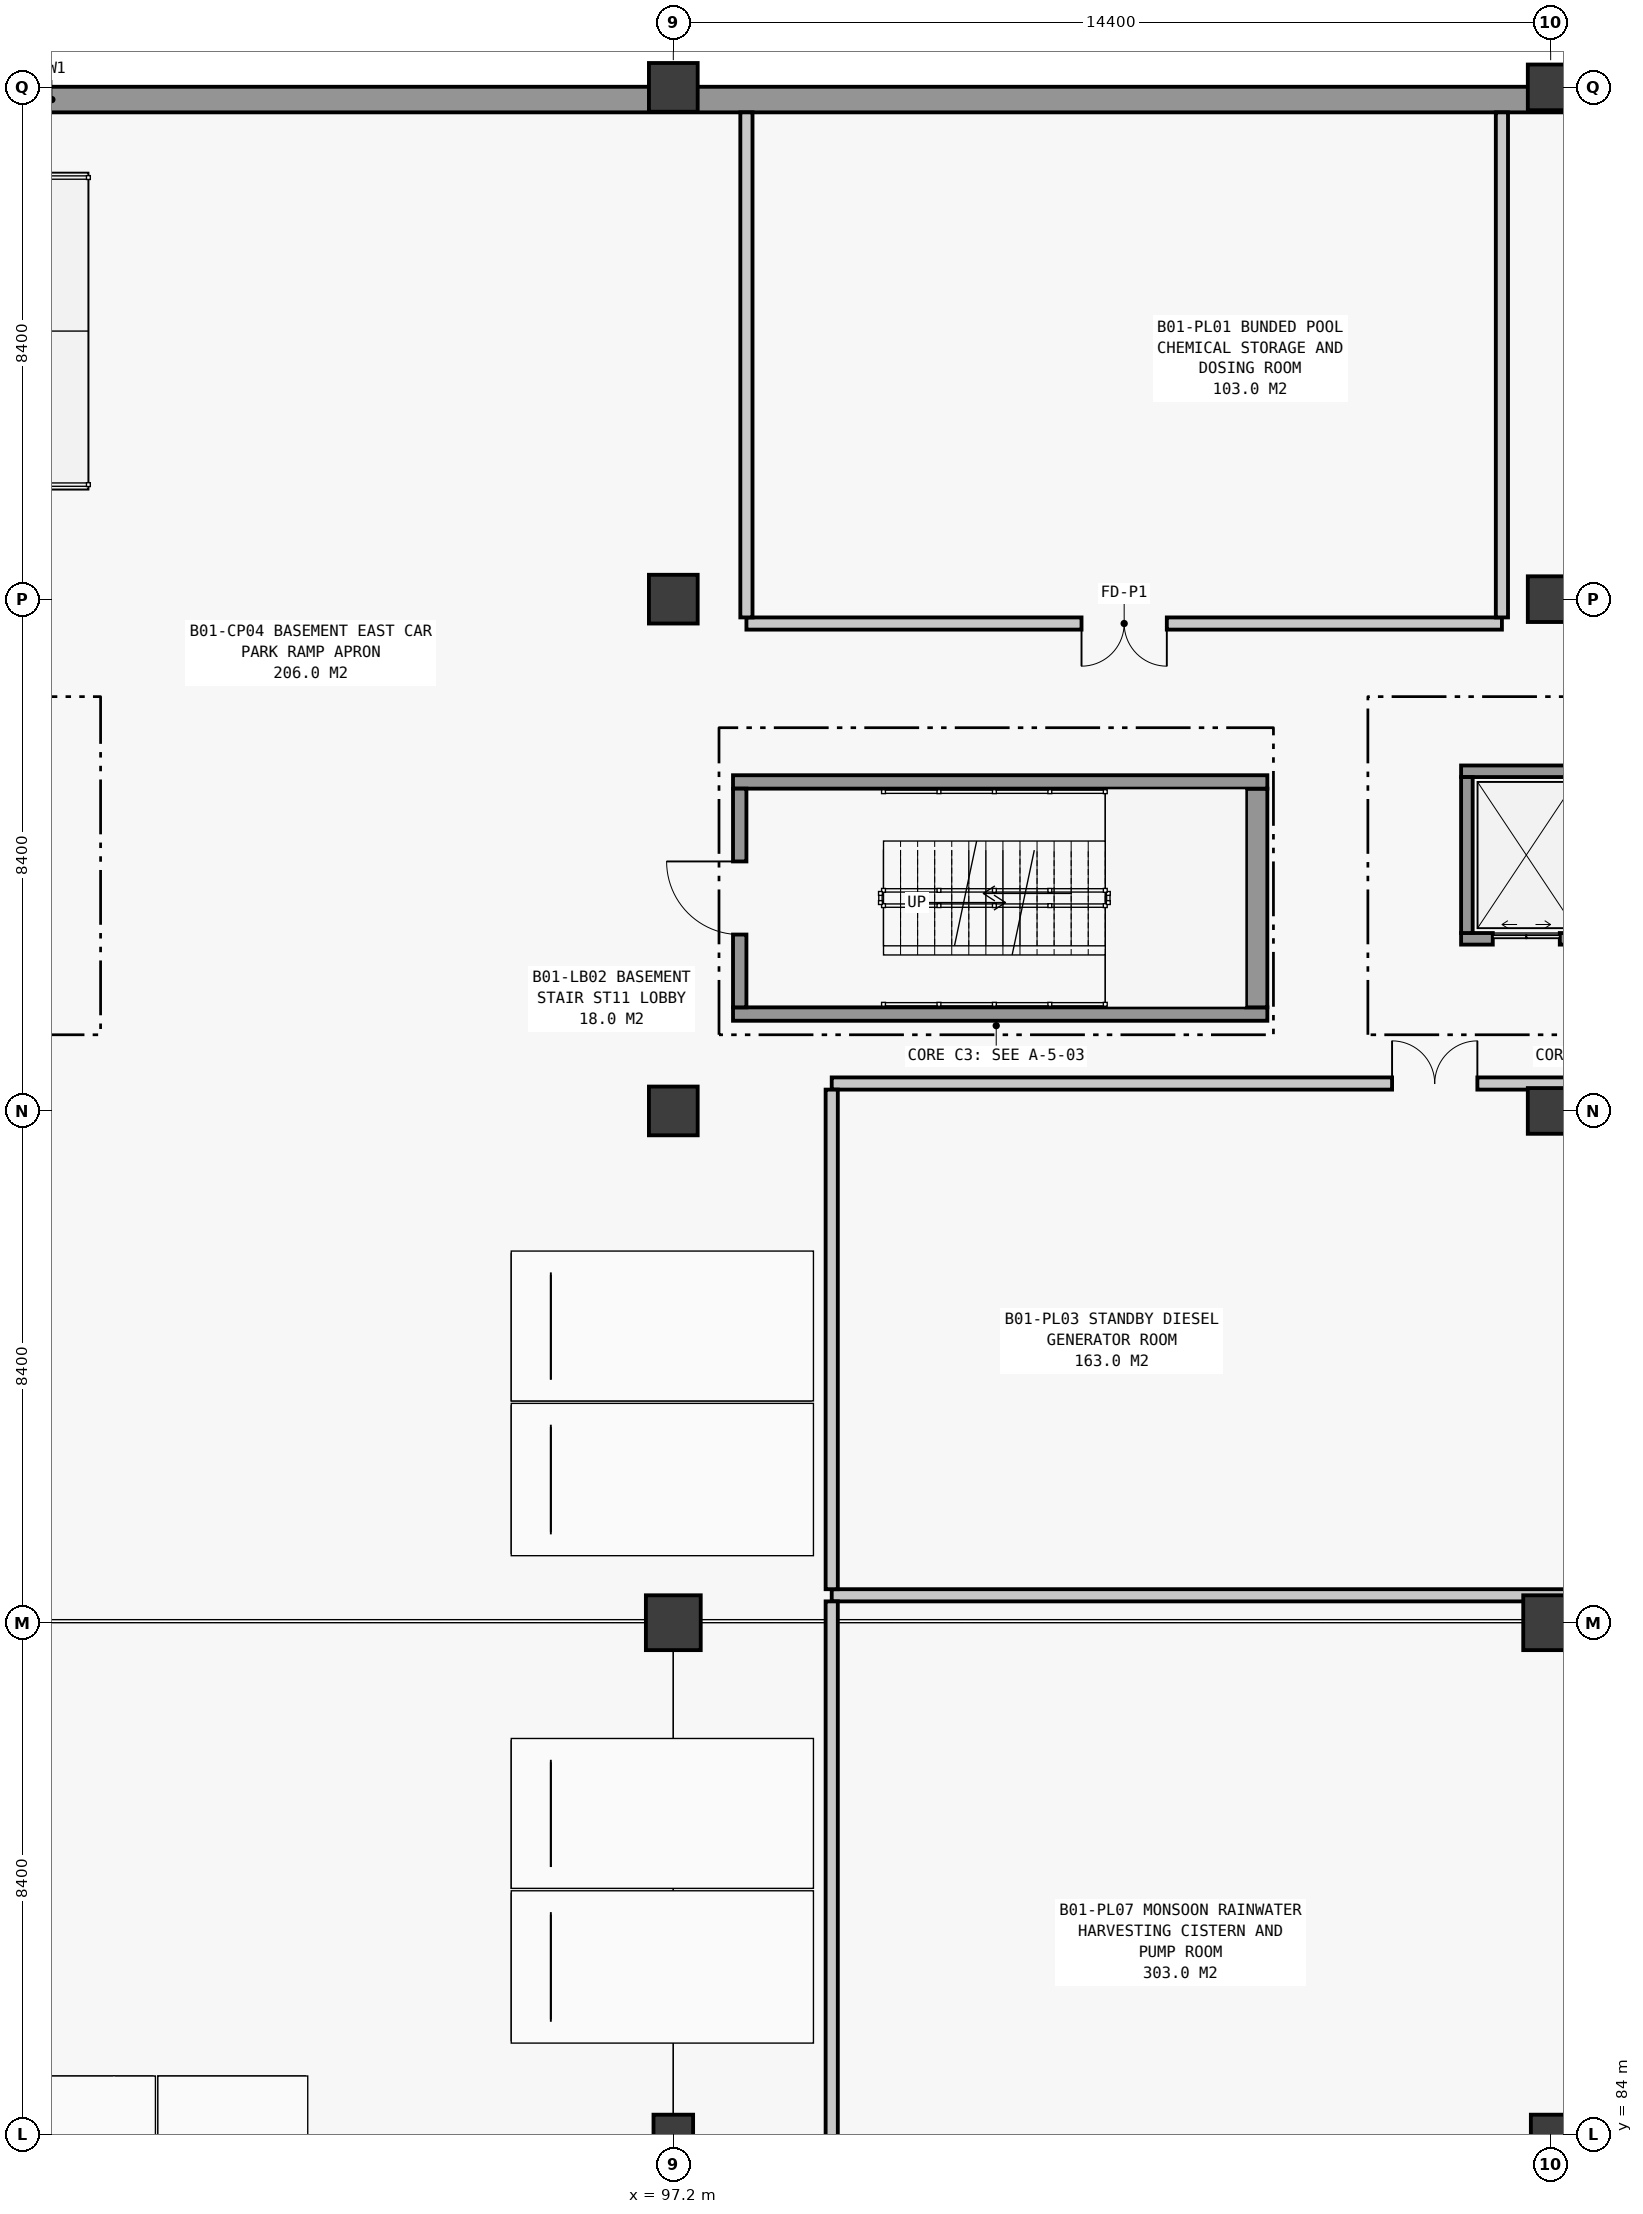
"""IFC4 building model, lengths in metres.
Left out: names, types, materials, properties, quantities, classifications, styles, units other than length and angle.
Written with IfcOpenShell. Run it as: python <this file> out.ifc"""

import sys

from ifc_helpers import new_model, si_unit, direction, frame, frame_2d, origin, origin_2d, place, context, subcontext, project, spatial, rectangle, extrude, element, fill, save


model = new_model("IFC4")
c1 = context("Model", 3, precision=1e-05, world=origin(), true_north=direction((0.0, 1.0)))
c2 = subcontext(c1, "Body", "Model", "MODEL_VIEW")
j1 = project(units=[si_unit("LENGTHUNIT", "METRE"), si_unit("PLANEANGLEUNIT", "RADIAN")], contexts=[c1])
p1 = place(None, origin())
s1 = spatial("IfcSite", under=j1, at=p1, CompositionType="ELEMENT")
p2 = place(p1, origin())
s2 = spatial("IfcBuilding", under=s1, at=p2, CompositionType="ELEMENT")
p3 = place(p2, frame((0.0, 0.0, -4.8)))
s3 = spatial("IfcBuildingStorey", under=s2, at=p3, CompositionType="ELEMENT", Elevation=-4.8)
p4 = place(p3, frame((97.2, 84.0, 0.0), z_axis=(0.0, 0.0, 1.0), x_axis=(1.0, 0.0, 0.0)))
e1 = element("IfcColumn", 1, at=p4, inside=s3, PredefinedType="COLUMN", context=c2, shape_type="SweptSolid", body=[
    extrude(rectangle(XDim=0.65, YDim=0.65, at=origin_2d()), origin(), (0.0, 0.0, 1.0), 4.8),
])
p5 = place(p3, frame((97.2, 92.4, 0.0), z_axis=(0.0, 0.0, 1.0), x_axis=(1.0, 0.0, 0.0)))
e2 = element("IfcColumn", 2, at=p5, inside=s3, PredefinedType="COLUMN", context=c2, shape_type="SweptSolid", body=[
    extrude(rectangle(XDim=0.9, YDim=0.9, at=origin_2d()), origin(), (0.0, 0.0, 1.0), 4.8),
])
for number, where, z_axis, x_axis in (
    (3, (97.2, 100.8, 0.0), (0.0, 0.0, 1.0), (1.0, 0.0, 0.0)),
    (4, (97.2, 109.2, 0.0), (0.0, 0.0, 1.0), (1.0, 0.0, 0.0)),
    (5, (97.2, 117.6, 0.0), (0.0, 0.0, 1.0), (1.0, 0.0, 0.0)),
):
    element("IfcColumn", number, at=place(p3, frame(where, z_axis=z_axis, x_axis=x_axis)), inside=s3, PredefinedType="COLUMN", context=c2, shape_type="SweptSolid", body=[
        extrude(rectangle(XDim=0.8, YDim=0.8, at=origin_2d()), origin(), (0.0, 0.0, 1.0), 4.8),
    ])
p6 = place(p3, frame((111.6, 84.0, 0.0), z_axis=(0.0, 0.0, 1.0), x_axis=(1.0, 0.0, 0.0)))
e6 = element("IfcColumn", 6, at=p6, inside=s3, PredefinedType="COLUMN", context=c2, shape_type="SweptSolid", body=[
    extrude(rectangle(XDim=0.65, YDim=0.65, at=origin_2d()), origin(), (0.0, 0.0, 1.0), 4.8),
])
p7 = place(p3, frame((111.6, 92.4, 0.0), z_axis=(0.0, 0.0, 1.0), x_axis=(1.0, 0.0, 0.0)))
e7 = element("IfcColumn", 7, at=p7, inside=s3, PredefinedType="COLUMN", context=c2, shape_type="SweptSolid", body=[
    extrude(rectangle(XDim=0.9, YDim=0.9, at=origin_2d()), origin(), (0.0, 0.0, 1.0), 4.8),
])
for number, where, z_axis, x_axis in (
    (8, (111.6, 100.8, 0.0), (0.0, 0.0, 1.0), (1.0, 0.0, 0.0)),
    (9, (111.6, 109.2, 0.0), (0.0, 0.0, 1.0), (1.0, 0.0, 0.0)),
    (10, (111.6, 117.6, 0.0), (0.0, 0.0, 1.0), (1.0, 0.0, 0.0)),
):
    element("IfcColumn", number, at=place(p3, frame(where, z_axis=z_axis, x_axis=x_axis)), inside=s3, PredefinedType="COLUMN", context=c2, shape_type="SweptSolid", body=[
        extrude(rectangle(XDim=0.75, YDim=0.75, at=origin_2d()), origin(), (0.0, 0.0, 1.0), 4.8),
    ])
p8 = place(p3, frame((125.8, 117.4, 0.0), z_axis=(0.0, 0.0, 1.0), x_axis=(-1.0, 0.0, 0.0)))
e11 = element("IfcWall", 11, at=p8, inside=s3, PredefinedType="USERDEFINED", context=c2, shape_type="SweptSolid", body=[
    extrude(rectangle(XDim=86.0, YDim=0.42, at=frame_2d((43.0, 0.0))), origin(), (0.0, 0.0, 1.0), 4.5),
])
p9 = place(p3, frame((98.18, 102.39, 0.0), z_axis=(0.0, 0.0, 1.0), x_axis=(1.0, 0.0, 0.0)))
e12 = element("IfcWall", 12, at=p9, inside=s3, PredefinedType="SOLIDWALL", context=c2, shape_type="SweptSolid", body=[
    extrude(rectangle(XDim=8.77, YDim=0.22, at=frame_2d((4.385, 0.0))), origin(), (0.0, 0.0, 1.0), 4.5),
])
p10 = place(p3, frame((106.775, 102.5, 0.0), z_axis=(0.0, 0.0, 1.0), x_axis=(0.0, 1.0, 0.0)))
e13 = element("IfcWall", 13, at=p10, inside=s3, PredefinedType="SHEAR", context=c2, shape_type="SweptSolid", body=[
    extrude(rectangle(XDim=3.59, YDim=0.35, at=frame_2d((1.795, 0.0))), origin(), (0.0, 0.0, 1.0), 4.5),
])
p11 = place(p3, frame((106.95, 106.2, 0.0), z_axis=(0.0, 0.0, 1.0), x_axis=(-1.0, 0.0, 0.0)))
e14 = element("IfcWall", 14, at=p11, inside=s3, PredefinedType="SOLIDWALL", context=c2, shape_type="SweptSolid", body=[
    extrude(rectangle(XDim=8.77, YDim=0.22, at=frame_2d((4.385, 0.0))), origin(), (0.0, 0.0, 1.0), 4.5),
])
p12 = place(p3, frame((98.29, 106.09, 0.0), z_axis=(0.0, 0.0, 1.0), x_axis=(0.0, -1.0, 0.0)))
e15 = element("IfcWall", 15, at=p12, inside=s3, PredefinedType="SOLIDWALL", context=c2, shape_type="SweptSolid", body=[
    extrude(rectangle(XDim=3.59, YDim=0.22, at=frame_2d((1.795, 0.0))), origin(), (0.0, 0.0, 1.0), 4.5),
])
p13 = place(p12, frame((1.195, 0.0, 0.0)))
e16 = element("IfcOpeningElement", 16, at=p13, cuts=e15, PredefinedType="OPENING", context=c2, shape_type="SweptSolid", body=[
    extrude(rectangle(XDim=1.2, YDim=2.2, at=frame_2d((0.6, 1.1))), frame((0.0, 0.125, 0.0), z_axis=(0.0, -1.0, 0.0), x_axis=(1.0, 0.0, 0.0)), (0.0, 0.0, 1.0), 0.25),
])
p14 = place(p3, frame((110.13, 103.625, 0.0), z_axis=(0.0, 0.0, 1.0), x_axis=(1.0, 0.0, 0.0)))
e17 = element("IfcWall", 17, at=p14, inside=s3, PredefinedType="SOLIDWALL", context=c2, shape_type="SweptSolid", body=[
    extrude(rectangle(XDim=2.14, YDim=0.19, at=frame_2d((1.07, 0.0))), origin(), (0.0, 0.0, 1.0), 4.5),
])
p15 = place(p14, frame((0.52, 0.0, 0.0)))
e18 = element("IfcOpeningElement", 18, at=p15, cuts=e17, PredefinedType="OPENING", context=c2, shape_type="SweptSolid", body=[
    extrude(rectangle(XDim=1.1, YDim=2.2, at=frame_2d((0.55, 1.1))), frame((0.0, 0.11, 0.0), z_axis=(0.0, -1.0, 0.0), x_axis=(1.0, 0.0, 0.0)), (0.0, 0.0, 1.0), 0.22),
])
p16 = place(p3, frame((112.27, 106.375, 0.0), z_axis=(0.0, 0.0, 1.0), x_axis=(-1.0, 0.0, 0.0)))
e19 = element("IfcWall", 19, at=p16, inside=s3, PredefinedType="SOLIDWALL", context=c2, shape_type="SweptSolid", body=[
    extrude(rectangle(XDim=2.14, YDim=0.19, at=frame_2d((1.07, 0.0))), origin(), (0.0, 0.0, 1.0), 4.5),
])
p17 = place(p3, frame((110.225, 106.28, 0.0), z_axis=(0.0, 0.0, 1.0), x_axis=(0.0, -1.0, 0.0)))
e20 = element("IfcWall", 20, at=p17, inside=s3, PredefinedType="SOLIDWALL", context=c2, shape_type="SweptSolid", body=[
    extrude(rectangle(XDim=2.56, YDim=0.19, at=frame_2d((1.28, 0.0))), origin(), (0.0, 0.0, 1.0), 4.5),
])
p18 = place(p3, frame((98.4, 108.8, 0.0), z_axis=(0.0, 0.0, 1.0), x_axis=(1.0, 0.0, 0.0)))
e21 = element("IfcWall", 21, at=p18, inside=s3, PredefinedType="PARTITIONING", context=c2, shape_type="SweptSolid", body=[
    extrude(rectangle(XDim=12.4, YDim=0.2, at=frame_2d((6.2, 0.0))), origin(), (0.0, 0.0, 1.0), 4.5),
])
p19 = place(p18, frame((5.5, 0.0, 0.0)))
e22 = element("IfcOpeningElement", 22, at=p19, cuts=e21, PredefinedType="OPENING", context=c2, shape_type="SweptSolid", body=[
    extrude(rectangle(XDim=1.4, YDim=2.2, at=frame_2d((0.7, 1.1))), frame((0.0, 0.115, 0.0), z_axis=(0.0, -1.0, 0.0), x_axis=(1.0, 0.0, 0.0)), (0.0, 0.0, 1.0), 0.23),
])
for number, where, z_axis, x_axis in (
    (23, (98.4, 108.9, 0.0), (0.0, 0.0, 1.0), (0.0, 1.0, 0.0)),
    (24, (110.8, 108.9, 0.0), (0.0, 0.0, 1.0), (0.0, 1.0, 0.0)),
):
    element("IfcWall", number, at=place(p3, frame(where, z_axis=z_axis, x_axis=x_axis)), inside=s3, PredefinedType="PARTITIONING", context=c2, shape_type="SweptSolid", body=[
        extrude(rectangle(XDim=8.29, YDim=0.2, at=frame_2d((4.145, 0.0))), origin(), (0.0, 0.0, 1.0), 3.55),
    ])
p20 = place(p3, frame((99.8, 101.25, 0.0), z_axis=(0.0, 0.0, 1.0), x_axis=(1.0, 0.0, 0.0)))
e25 = element("IfcWall", 25, at=p20, inside=s3, PredefinedType="PARTITIONING", context=c2, shape_type="SweptSolid", body=[
    extrude(rectangle(XDim=19.4, YDim=0.2, at=frame_2d((9.7, 0.0))), origin(), (0.0, 0.0, 1.0), 3.75),
])
p21 = place(p20, frame((9.197, 0.0, 0.0)))
e26 = element("IfcOpeningElement", 26, at=p21, cuts=e25, PredefinedType="OPENING", context=c2, shape_type="SweptSolid", body=[
    extrude(rectangle(XDim=1.4, YDim=2.2, at=frame_2d((0.7, 1.1))), frame((0.0, 0.115, 0.0), z_axis=(0.0, -1.0, 0.0), x_axis=(1.0, 0.0, 0.0)), (0.0, 0.0, 1.0), 0.23),
])
p22 = place(p3, frame((99.8, 92.85, 0.0), z_axis=(0.0, 0.0, 1.0), x_axis=(1.0, 0.0, 0.0)))
e27 = element("IfcWall", 27, at=p22, inside=s3, PredefinedType="PARTITIONING", context=c2, shape_type="SweptSolid", body=[
    extrude(rectangle(XDim=19.4, YDim=0.2, at=frame_2d((9.7, 0.0))), origin(), (0.0, 0.0, 1.0), 3.75),
])
p23 = place(p3, frame((99.8, 92.95, 0.0), z_axis=(0.0, 0.0, 1.0), x_axis=(0.0, 1.0, 0.0)))
e28 = element("IfcWall", 28, at=p23, inside=s3, PredefinedType="PARTITIONING", context=c2, shape_type="SweptSolid", body=[
    extrude(rectangle(XDim=8.2, YDim=0.2, at=frame_2d((4.1, 0.0))), origin(), (0.0, 0.0, 1.0), 3.55),
])
p24 = place(p3, frame((99.8, 80.1, 0.0), z_axis=(0.0, 0.0, 1.0), x_axis=(0.0, 1.0, 0.0)))
e29 = element("IfcWall", 29, at=p24, inside=s3, PredefinedType="PARTITIONING", context=c2, shape_type="SweptSolid", body=[
    extrude(rectangle(XDim=12.65, YDim=0.2, at=frame_2d((6.325, 0.0))), origin(), (0.0, 0.0, 1.0), 3.53),
])
p25 = place(p13, frame((1.2, 0.0, 0.0), z_axis=(0.0, 0.0, 1.0), x_axis=(-1.0, 0.0, 0.0)))
e30 = element("IfcDoor", 30, at=p25, inside=s3, OperationType="SINGLE_SWING_LEFT", PredefinedType="DOOR", context=c2, shape_type="SweptSolid", body=[
    extrude(rectangle(XDim=1.2, YDim=2.2, at=frame_2d((0.6, 1.1))), frame((0.0, 0.025, 0.0), z_axis=(0.0, -1.0, 0.0), x_axis=(1.0, 0.0, 0.0)), (0.0, 0.0, 1.0), 0.05),
])
fill(e16, e30)
p26 = place(p15, origin())
e31 = element("IfcDoor", 31, at=p26, inside=s3, OperationType="DOUBLE_DOOR_SLIDING", PredefinedType="DOOR", context=c2, shape_type="SweptSolid", body=[
    extrude(rectangle(XDim=1.1, YDim=2.2, at=frame_2d((0.55, 1.1))), frame((0.0, 0.025, 0.0), z_axis=(0.0, -1.0, 0.0), x_axis=(1.0, 0.0, 0.0)), (0.0, 0.0, 1.0), 0.05),
])
fill(e18, e31)
p27 = place(p19, frame((1.4, 0.0, 0.0), z_axis=(0.0, 0.0, 1.0), x_axis=(-1.0, 0.0, 0.0)))
e32 = element("IfcDoor", 32, at=p27, inside=s3, OperationType="DOUBLE_DOOR_SINGLE_SWING", PredefinedType="DOOR", context=c2, shape_type="SweptSolid", body=[
    extrude(rectangle(XDim=1.4, YDim=2.2, at=frame_2d((0.7, 1.1))), frame((0.0, 0.025, 0.0), z_axis=(0.0, -1.0, 0.0), x_axis=(1.0, 0.0, 0.0)), (0.0, 0.0, 1.0), 0.05),
])
fill(e22, e32)
p28 = place(p21, origin())
e33 = element("IfcDoor", 33, at=p28, inside=s3, OperationType="DOUBLE_DOOR_SINGLE_SWING", PredefinedType="DOOR", context=c2, shape_type="SweptSolid", body=[
    extrude(rectangle(XDim=1.4, YDim=2.2, at=frame_2d((0.7, 1.1))), frame((0.0, 0.025, 0.0), z_axis=(0.0, -1.0, 0.0), x_axis=(1.0, 0.0, 0.0)), (0.0, 0.0, 1.0), 0.05),
])
fill(e26, e33)
save(model, sys.argv[1])
